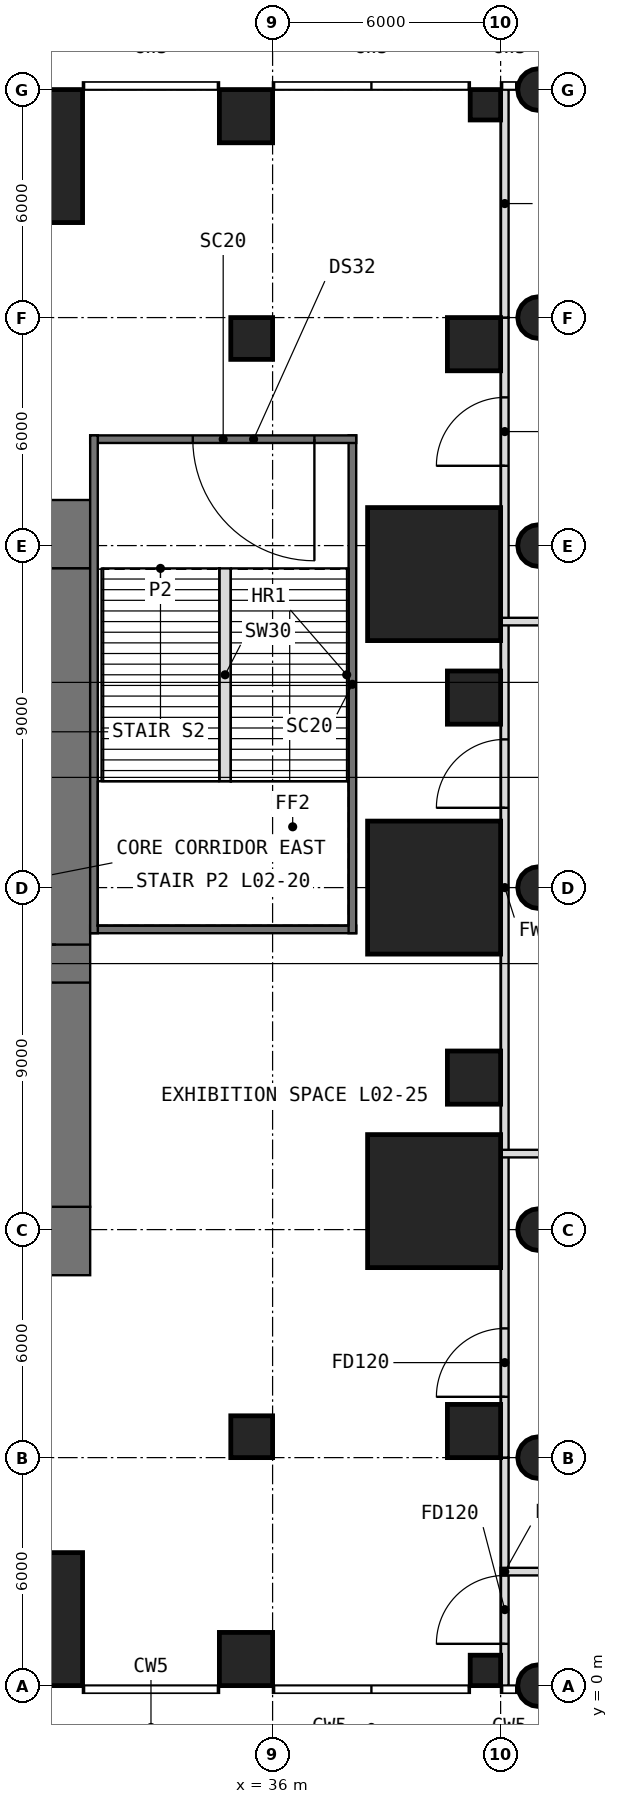
"""IFC4 building model, lengths in metres.
Left out: names, types, materials, properties, quantities, classifications, styles, units other than length and angle.
Written with IfcOpenShell. Run it as: python <this file> out.ifc"""

import sys

from ifc_helpers import new_model, si_unit, direction, frame, frame_2d, origin, origin_2d, place, context, subcontext, project, spatial, rectangle, circle, extrude, element, fill, save


model = new_model("IFC4")
c1 = context("Model", 3, precision=1e-05, world=origin(), true_north=direction((0.0, 1.0)))
c2 = subcontext(c1, "Body", "Model", "MODEL_VIEW")
j1 = project(units=[si_unit("LENGTHUNIT", "METRE"), si_unit("PLANEANGLEUNIT", "RADIAN")], contexts=[c1])
p1 = place(None, origin())
s1 = spatial("IfcSite", under=j1, at=p1, CompositionType="ELEMENT")
p2 = place(p1, origin())
s2 = spatial("IfcBuilding", under=s1, at=p2, CompositionType="ELEMENT")
p3 = place(p2, frame((0.0, 0.0, 11.0)))
s3 = spatial("IfcBuildingStorey", under=s2, at=p3, CompositionType="ELEMENT", Elevation=11.0)
p4 = place(p3, frame((29.25, 1.75, 0.0), z_axis=(0.0, 0.0, 1.0), x_axis=(1.0, 0.0, 0.0)))
e1 = element("IfcColumn", 1, at=p4, inside=s3, PredefinedType="COLUMN", context=c2, shape_type="SweptSolid", body=[
    extrude(rectangle(XDim=3.5, YDim=3.5, at=origin_2d()), origin(), (0.0, 0.0, 1.0), 7.0),
])
p5 = place(p3, frame((35.3, 0.7, 0.0), z_axis=(0.0, 0.0, 1.0), x_axis=(1.0, 0.0, 0.0)))
e2 = element("IfcColumn", 2, at=p5, inside=s3, PredefinedType="COLUMN", context=c2, shape_type="SweptSolid", body=[
    extrude(rectangle(XDim=1.4, YDim=1.4, at=origin_2d()), origin(), (0.0, 0.0, 1.0), 7.0),
])
p6 = place(p3, frame((41.6, 0.4, 0.0), z_axis=(0.0, 0.0, 1.0), x_axis=(1.0, 0.0, 0.0)))
e3 = element("IfcColumn", 3, at=p6, inside=s3, PredefinedType="COLUMN", context=c2, shape_type="SweptSolid", body=[
    extrude(rectangle(XDim=0.8, YDim=0.8, at=origin_2d()), origin(), (0.0, 0.0, 1.0), 7.0),
])
p7 = place(p3, frame((43.0, 0.0, 0.0), z_axis=(0.0, 0.0, 1.0), x_axis=(1.0, 0.0, 0.0)))
e4 = element("IfcColumn", 4, at=p7, inside=s3, PredefinedType="COLUMN", context=c2, shape_type="SweptSolid", body=[
    extrude(circle(Radius=0.55, at=origin_2d()), origin(), (0.0, 0.0, 1.0), 7.0),
])
p8 = place(p3, frame((35.45, 6.55, 0.0), z_axis=(0.0, 0.0, 1.0), x_axis=(1.0, 0.0, 0.0)))
e5 = element("IfcColumn", 5, at=p8, inside=s3, PredefinedType="COLUMN", context=c2, shape_type="SweptSolid", body=[
    extrude(rectangle(XDim=1.1, YDim=1.1, at=origin_2d()), origin(), (0.0, 0.0, 1.0), 7.0),
])
p9 = place(p3, frame((41.3, 6.7, 0.0), z_axis=(0.0, 0.0, 1.0), x_axis=(1.0, 0.0, 0.0)))
e6 = element("IfcColumn", 6, at=p9, inside=s3, PredefinedType="COLUMN", context=c2, shape_type="SweptSolid", body=[
    extrude(rectangle(XDim=1.4, YDim=1.4, at=origin_2d()), origin(), (0.0, 0.0, 1.0), 7.0),
])
p10 = place(p3, frame((43.0, 6.0, 0.0), z_axis=(0.0, 0.0, 1.0), x_axis=(1.0, 0.0, 0.0)))
e7 = element("IfcColumn", 7, at=p10, inside=s3, PredefinedType="COLUMN", context=c2, shape_type="SweptSolid", body=[
    extrude(circle(Radius=0.55, at=origin_2d()), origin(), (0.0, 0.0, 1.0), 7.0),
])
p11 = place(p3, frame((40.25, 12.75, 0.0), z_axis=(0.0, 0.0, 1.0), x_axis=(1.0, 0.0, 0.0)))
e8 = element("IfcColumn", 8, at=p11, inside=s3, PredefinedType="COLUMN", context=c2, shape_type="SweptSolid", body=[
    extrude(rectangle(XDim=3.5, YDim=3.5, at=origin_2d()), origin(), (0.0, 0.0, 1.0), 7.0),
])
p12 = place(p3, frame((43.0, 12.0, 0.0), z_axis=(0.0, 0.0, 1.0), x_axis=(1.0, 0.0, 0.0)))
e9 = element("IfcColumn", 9, at=p12, inside=s3, PredefinedType="COLUMN", context=c2, shape_type="SweptSolid", body=[
    extrude(circle(Radius=0.55, at=origin_2d()), origin(), (0.0, 0.0, 1.0), 7.0),
])
p13 = place(p3, frame((41.3, 16.0, 0.0), z_axis=(0.0, 0.0, 1.0), x_axis=(1.0, 0.0, 0.0)))
e10 = element("IfcColumn", 10, at=p13, inside=s3, PredefinedType="COLUMN", context=c2, shape_type="SweptSolid", body=[
    extrude(rectangle(XDim=1.4, YDim=1.4, at=origin_2d()), origin(), (0.0, 0.0, 1.0), 7.0),
])
p14 = place(p3, frame((40.25, 21.0, 0.0), z_axis=(0.0, 0.0, 1.0), x_axis=(1.0, 0.0, 0.0)))
e11 = element("IfcColumn", 11, at=p14, inside=s3, PredefinedType="COLUMN", context=c2, shape_type="SweptSolid", body=[
    extrude(rectangle(XDim=3.5, YDim=3.5, at=origin_2d()), origin(), (0.0, 0.0, 1.0), 7.0),
])
p15 = place(p3, frame((43.0, 21.0, 0.0), z_axis=(0.0, 0.0, 1.0), x_axis=(1.0, 0.0, 0.0)))
e12 = element("IfcColumn", 12, at=p15, inside=s3, PredefinedType="COLUMN", context=c2, shape_type="SweptSolid", body=[
    extrude(circle(Radius=0.55, at=origin_2d()), origin(), (0.0, 0.0, 1.0), 7.0),
])
p16 = place(p3, frame((41.3, 26.0, 0.0), z_axis=(0.0, 0.0, 1.0), x_axis=(1.0, 0.0, 0.0)))
e13 = element("IfcColumn", 13, at=p16, inside=s3, PredefinedType="COLUMN", context=c2, shape_type="SweptSolid", body=[
    extrude(rectangle(XDim=1.4, YDim=1.4, at=origin_2d()), origin(), (0.0, 0.0, 1.0), 7.0),
])
p17 = place(p3, frame((43.0, 30.0, 0.0), z_axis=(0.0, 0.0, 1.0), x_axis=(1.0, 0.0, 0.0)))
e14 = element("IfcColumn", 14, at=p17, inside=s3, PredefinedType="COLUMN", context=c2, shape_type="SweptSolid", body=[
    extrude(circle(Radius=0.55, at=origin_2d()), origin(), (0.0, 0.0, 1.0), 7.0),
])
p18 = place(p3, frame((40.25, 29.25, 0.0), z_axis=(0.0, 0.0, 1.0), x_axis=(1.0, 0.0, 0.0)))
e15 = element("IfcColumn", 15, at=p18, inside=s3, PredefinedType="COLUMN", context=c2, shape_type="SweptSolid", body=[
    extrude(rectangle(XDim=3.5, YDim=3.5, at=origin_2d()), origin(), (0.0, 0.0, 1.0), 7.0),
])
p19 = place(p3, frame((35.45, 35.45, 0.0), z_axis=(0.0, 0.0, 1.0), x_axis=(1.0, 0.0, 0.0)))
e16 = element("IfcColumn", 16, at=p19, inside=s3, PredefinedType="COLUMN", context=c2, shape_type="SweptSolid", body=[
    extrude(rectangle(XDim=1.1, YDim=1.1, at=origin_2d()), origin(), (0.0, 0.0, 1.0), 7.0),
])
p20 = place(p3, frame((41.3, 35.3, 0.0), z_axis=(0.0, 0.0, 1.0), x_axis=(1.0, 0.0, 0.0)))
e17 = element("IfcColumn", 17, at=p20, inside=s3, PredefinedType="COLUMN", context=c2, shape_type="SweptSolid", body=[
    extrude(rectangle(XDim=1.4, YDim=1.4, at=origin_2d()), origin(), (0.0, 0.0, 1.0), 7.0),
])
p21 = place(p3, frame((43.0, 36.0, 0.0), z_axis=(0.0, 0.0, 1.0), x_axis=(1.0, 0.0, 0.0)))
e18 = element("IfcColumn", 18, at=p21, inside=s3, PredefinedType="COLUMN", context=c2, shape_type="SweptSolid", body=[
    extrude(circle(Radius=0.55, at=origin_2d()), origin(), (0.0, 0.0, 1.0), 7.0),
])
p22 = place(p3, frame((29.25, 40.25, 0.0), z_axis=(0.0, 0.0, 1.0), x_axis=(1.0, 0.0, 0.0)))
e19 = element("IfcColumn", 19, at=p22, inside=s3, PredefinedType="COLUMN", context=c2, shape_type="SweptSolid", body=[
    extrude(rectangle(XDim=3.5, YDim=3.5, at=origin_2d()), origin(), (0.0, 0.0, 1.0), 7.0),
])
p23 = place(p3, frame((35.3, 41.3, 0.0), z_axis=(0.0, 0.0, 1.0), x_axis=(1.0, 0.0, 0.0)))
e20 = element("IfcColumn", 20, at=p23, inside=s3, PredefinedType="COLUMN", context=c2, shape_type="SweptSolid", body=[
    extrude(rectangle(XDim=1.4, YDim=1.4, at=origin_2d()), origin(), (0.0, 0.0, 1.0), 7.0),
])
p24 = place(p3, frame((41.6, 41.6, 0.0), z_axis=(0.0, 0.0, 1.0), x_axis=(1.0, 0.0, 0.0)))
e21 = element("IfcColumn", 21, at=p24, inside=s3, PredefinedType="COLUMN", context=c2, shape_type="SweptSolid", body=[
    extrude(rectangle(XDim=0.8, YDim=0.8, at=origin_2d()), origin(), (0.0, 0.0, 1.0), 7.0),
])
p25 = place(p3, frame((43.0, 42.0, 0.0), z_axis=(0.0, 0.0, 1.0), x_axis=(1.0, 0.0, 0.0)))
e22 = element("IfcColumn", 22, at=p25, inside=s3, PredefinedType="COLUMN", context=c2, shape_type="SweptSolid", body=[
    extrude(circle(Radius=0.55, at=origin_2d()), origin(), (0.0, 0.0, 1.0), 7.0),
])
p26 = place(p3, frame((10.8, 11.7, -0.3), z_axis=(0.0, 0.0, 1.0), x_axis=(1.0, 0.0, 0.0)))
e23 = element("IfcWall", 23, at=p26, inside=s3, PredefinedType="SHEAR", context=c2, shape_type="SweptSolid", body=[
    extrude(rectangle(XDim=20.4, YDim=1.8, at=frame_2d((10.2, 0.0))), origin(), (0.0, 0.0, 1.0), 7.1),
])
p27 = place(p26, frame((9.2, 0.0, 0.3)))
e24 = element("IfcOpeningElement", 24, at=p27, cuts=e23, PredefinedType="OPENING", context=c2, shape_type="SweptSolid", body=[
    extrude(rectangle(XDim=2.0, YDim=2.2, at=frame_2d((1.0, 1.1))), frame((0.0, 0.91, 0.0), z_axis=(0.0, -1.0, 0.0), x_axis=(1.0, 0.0, 0.0)), (0.0, 0.0, 1.0), 1.82),
])
p28 = place(p3, frame((10.8, 30.3, -0.3), z_axis=(0.0, 0.0, 1.0), x_axis=(1.0, 0.0, 0.0)))
e25 = element("IfcWall", 25, at=p28, inside=s3, PredefinedType="SHEAR", context=c2, shape_type="SweptSolid", body=[
    extrude(rectangle(XDim=20.4, YDim=1.8, at=frame_2d((10.2, 0.0))), origin(), (0.0, 0.0, 1.0), 7.1),
])
p29 = place(p28, frame((9.2, 0.0, 0.3)))
e26 = element("IfcOpeningElement", 26, at=p29, cuts=e25, PredefinedType="OPENING", context=c2, shape_type="SweptSolid", body=[
    extrude(rectangle(XDim=2.0, YDim=2.2, at=frame_2d((1.0, 1.1))), frame((0.0, 0.91, 0.0), z_axis=(0.0, -1.0, 0.0), x_axis=(1.0, 0.0, 0.0)), (0.0, 0.0, 1.0), 1.82),
])
p30 = place(p3, frame((30.3, 12.6, -0.3), z_axis=(0.0, 0.0, 1.0), x_axis=(0.0, 1.0, 0.0)))
e27 = element("IfcWall", 27, at=p30, inside=s3, PredefinedType="SHEAR", context=c2, shape_type="SweptSolid", body=[
    extrude(rectangle(XDim=16.8, YDim=1.8, at=frame_2d((8.4, 0.0))), origin(), (0.0, 0.0, 1.0), 7.1),
])
p31 = place(p30, frame((5.9, 0.0, 0.3)))
e28 = element("IfcOpeningElement", 28, at=p31, cuts=e27, PredefinedType="OPENING", context=c2, shape_type="SweptSolid", body=[
    extrude(rectangle(XDim=1.0, YDim=2.2, at=frame_2d((0.5, 1.1))), frame((0.0, 0.91, 0.0), z_axis=(0.0, -1.0, 0.0), x_axis=(1.0, 0.0, 0.0)), (0.0, 0.0, 1.0), 1.82),
])
p32 = place(p3, frame((31.2, 19.9, -0.3), z_axis=(0.0, 0.0, 1.0), x_axis=(1.0, 0.0, 0.0)))
e29 = element("IfcWall", 29, at=p32, inside=s3, PredefinedType="SOLIDWALL", context=c2, shape_type="SweptSolid", body=[
    extrude(rectangle(XDim=7.0, YDim=0.2, at=frame_2d((3.5, 0.0))), origin(), (0.0, 0.0, 1.0), 7.1),
])
p33 = place(p3, frame((38.1, 19.8, -0.3), z_axis=(0.0, 0.0, 1.0), x_axis=(0.0, 1.0, 0.0)))
e30 = element("IfcWall", 30, at=p33, inside=s3, PredefinedType="SOLIDWALL", context=c2, shape_type="SweptSolid", body=[
    extrude(rectangle(XDim=13.1, YDim=0.2, at=frame_2d((6.55, 0.0))), origin(), (0.0, 0.0, 1.0), 7.1),
])
p34 = place(p3, frame((38.2, 32.8, -0.3), z_axis=(0.0, 0.0, 1.0), x_axis=(-1.0, 0.0, 0.0)))
e31 = element("IfcWall", 31, at=p34, inside=s3, PredefinedType="SOLIDWALL", context=c2, shape_type="SweptSolid", body=[
    extrude(rectangle(XDim=7.0, YDim=0.2, at=frame_2d((3.5, 0.0))), origin(), (0.0, 0.0, 1.0), 7.1),
])
p35 = place(p34, frame((1.1, 0.0, 0.3)))
e32 = element("IfcOpeningElement", 32, at=p35, cuts=e31, PredefinedType="OPENING", context=c2, shape_type="SweptSolid", body=[
    extrude(rectangle(XDim=3.2, YDim=2.4, at=frame_2d((1.6, 1.2))), frame((0.0, 0.11, 0.0), z_axis=(0.0, -1.0, 0.0), x_axis=(1.0, 0.0, 0.0)), (0.0, 0.0, 1.0), 0.22),
])
p36 = place(p3, frame((31.3, 32.9, -0.3), z_axis=(0.0, 0.0, 1.0), x_axis=(0.0, -1.0, 0.0)))
e33 = element("IfcWall", 33, at=p36, inside=s3, PredefinedType="SOLIDWALL", context=c2, shape_type="SweptSolid", body=[
    extrude(rectangle(XDim=13.1, YDim=0.2, at=frame_2d((6.55, 0.0))), origin(), (0.0, 0.0, 1.0), 7.1),
])
p37 = place(p3, frame((42.11, 0.0, 0.0), z_axis=(0.0, 0.0, 1.0), x_axis=(0.0, 1.0, 0.0)))
e34 = element("IfcWall", 34, at=p37, inside=s3, PredefinedType="PARTITIONING", context=c2, shape_type="SweptSolid", body=[
    extrude(rectangle(XDim=6.0, YDim=0.2, at=frame_2d((3.0, 0.0))), origin(), (0.0, 0.0, 1.0), 5.98),
])
p38 = place(p37, frame((1.1, 0.0, 0.0)))
e35 = element("IfcOpeningElement", 35, at=p38, cuts=e34, PredefinedType="OPENING", context=c2, shape_type="SweptSolid", body=[
    extrude(rectangle(XDim=1.8, YDim=2.4, at=frame_2d((0.9, 1.2))), frame((0.0, 0.11, 0.0), z_axis=(0.0, -1.0, 0.0), x_axis=(1.0, 0.0, 0.0)), (0.0, 0.0, 1.0), 0.22),
])
p39 = place(p3, frame((42.11, 6.0, 0.0), z_axis=(0.0, 0.0, 1.0), x_axis=(0.0, 1.0, 0.0)))
e36 = element("IfcWall", 36, at=p39, inside=s3, PredefinedType="PARTITIONING", context=c2, shape_type="SweptSolid", body=[
    extrude(rectangle(XDim=30.0, YDim=0.2, at=frame_2d((15.0, 0.0))), origin(), (0.0, 0.0, 1.0), 6.6),
])
p40 = place(p39, frame((1.6, 0.0, 0.0)))
e37 = element("IfcOpeningElement", 37, at=p40, cuts=e36, PredefinedType="OPENING", context=c2, shape_type="SweptSolid", body=[
    extrude(rectangle(XDim=1.8, YDim=2.4, at=frame_2d((0.9, 1.2))), frame((0.0, 0.11, 0.0), z_axis=(0.0, -1.0, 0.0), x_axis=(1.0, 0.0, 0.0)), (0.0, 0.0, 1.0), 0.22),
])
p41 = place(p39, frame((17.1, 0.0, 0.0)))
e38 = element("IfcOpeningElement", 38, at=p41, cuts=e36, PredefinedType="OPENING", context=c2, shape_type="SweptSolid", body=[
    extrude(rectangle(XDim=1.8, YDim=2.4, at=frame_2d((0.9, 1.2))), frame((0.0, 0.11, 0.0), z_axis=(0.0, -1.0, 0.0), x_axis=(1.0, 0.0, 0.0)), (0.0, 0.0, 1.0), 0.22),
])
p42 = place(p39, frame((26.1, 0.0, 0.0)))
e39 = element("IfcOpeningElement", 39, at=p42, cuts=e36, PredefinedType="OPENING", context=c2, shape_type="SweptSolid", body=[
    extrude(rectangle(XDim=1.8, YDim=2.4, at=frame_2d((0.9, 1.2))), frame((0.0, 0.11, 0.0), z_axis=(0.0, -1.0, 0.0), x_axis=(1.0, 0.0, 0.0)), (0.0, 0.0, 1.0), 0.22),
])
p43 = place(p3, frame((42.11, 36.0, 0.0), z_axis=(0.0, 0.0, 1.0), x_axis=(0.0, 1.0, 0.0)))
e40 = element("IfcWall", 40, at=p43, inside=s3, PredefinedType="PARTITIONING", context=c2, shape_type="SweptSolid", body=[
    extrude(rectangle(XDim=6.0, YDim=0.2, at=frame_2d((3.0, 0.0))), origin(), (0.0, 0.0, 1.0), 5.98),
])
for number, where, z_axis, x_axis in (
    (41, (42.0, 3.0, 0.0), (0.0, 0.0, 1.0), (1.0, 0.0, 0.0)),
    (42, (42.0, 14.0, 0.0), (0.0, 0.0, 1.0), (1.0, 0.0, 0.0)),
):
    element("IfcWall", number, at=place(p3, frame(where, z_axis=z_axis, x_axis=x_axis)), inside=s3, PredefinedType="PARTITIONING", context=c2, shape_type="SweptSolid", body=[
        extrude(rectangle(XDim=13.7, YDim=0.2, at=frame_2d((6.85, 0.0))), origin(), (0.0, 0.0, 1.0), 6.6),
    ])
p44 = place(p3, frame((42.0, 28.0, 0.0), z_axis=(0.0, 0.0, 1.0), x_axis=(1.0, 0.0, 0.0)))
e43 = element("IfcWall", 43, at=p44, inside=s3, PredefinedType="PARTITIONING", context=c2, shape_type="SweptSolid", body=[
    extrude(rectangle(XDim=21.0, YDim=0.2, at=frame_2d((10.5, 0.0))), origin(), (0.0, 0.0, 1.0), 6.6),
])
p45 = place(p3, frame((34.75, 23.8, 0.0), z_axis=(0.0, 0.0, 1.0), x_axis=(0.0, 1.0, 0.0)))
e44 = element("IfcWall", 44, at=p45, inside=s3, PredefinedType="PARTITIONING", context=c2, shape_type="SweptSolid", body=[
    extrude(rectangle(XDim=5.6, YDim=0.3, at=frame_2d((2.8, 0.0))), origin(), (0.0, 0.0, 1.0), 7.0),
])
p46 = place(p31, origin())
e45 = element("IfcDoor", 45, at=p46, inside=s3, OperationType="SINGLE_SWING_RIGHT", PredefinedType="DOOR", context=c2, shape_type="SweptSolid", body=[
    extrude(rectangle(XDim=1.0, YDim=2.2, at=frame_2d((0.5, 1.1))), frame((0.0, 0.025, 0.0), z_axis=(0.0, -1.0, 0.0), x_axis=(1.0, 0.0, 0.0)), (0.0, 0.0, 1.0), 0.05),
])
fill(e28, e45)
p47 = place(p35, origin())
e46 = element("IfcDoor", 46, at=p47, inside=s3, OperationType="DOUBLE_DOOR_SINGLE_SWING", PredefinedType="DOOR", context=c2, shape_type="SweptSolid", body=[
    extrude(rectangle(XDim=3.2, YDim=2.4, at=frame_2d((1.6, 1.2))), frame((0.0, 0.025, 0.0), z_axis=(0.0, -1.0, 0.0), x_axis=(1.0, 0.0, 0.0)), (0.0, 0.0, 1.0), 0.05),
])
fill(e32, e46)
p48 = place(p38, origin())
e47 = element("IfcDoor", 47, at=p48, inside=s3, OperationType="DOUBLE_DOOR_SINGLE_SWING", PredefinedType="DOOR", context=c2, shape_type="SweptSolid", body=[
    extrude(rectangle(XDim=1.8, YDim=2.4, at=frame_2d((0.9, 1.2))), frame((0.0, 0.025, 0.0), z_axis=(0.0, -1.0, 0.0), x_axis=(1.0, 0.0, 0.0)), (0.0, 0.0, 1.0), 0.05),
])
fill(e35, e47)
p49 = place(p40, origin())
e48 = element("IfcDoor", 48, at=p49, inside=s3, OperationType="DOUBLE_DOOR_SINGLE_SWING", PredefinedType="DOOR", context=c2, shape_type="SweptSolid", body=[
    extrude(rectangle(XDim=1.8, YDim=2.4, at=frame_2d((0.9, 1.2))), frame((0.0, 0.025, 0.0), z_axis=(0.0, -1.0, 0.0), x_axis=(1.0, 0.0, 0.0)), (0.0, 0.0, 1.0), 0.05),
])
fill(e37, e48)
p50 = place(p41, origin())
e49 = element("IfcDoor", 49, at=p50, inside=s3, OperationType="DOUBLE_DOOR_SINGLE_SWING", PredefinedType="DOOR", context=c2, shape_type="SweptSolid", body=[
    extrude(rectangle(XDim=1.8, YDim=2.4, at=frame_2d((0.9, 1.2))), frame((0.0, 0.025, 0.0), z_axis=(0.0, -1.0, 0.0), x_axis=(1.0, 0.0, 0.0)), (0.0, 0.0, 1.0), 0.05),
])
fill(e38, e49)
p51 = place(p42, origin())
e50 = element("IfcDoor", 50, at=p51, inside=s3, OperationType="DOUBLE_DOOR_SINGLE_SWING", PredefinedType="DOOR", context=c2, shape_type="SweptSolid", body=[
    extrude(rectangle(XDim=1.8, YDim=2.4, at=frame_2d((0.9, 1.2))), frame((0.0, 0.025, 0.0), z_axis=(0.0, -1.0, 0.0), x_axis=(1.0, 0.0, 0.0)), (0.0, 0.0, 1.0), 0.05),
])
fill(e39, e50)
save(model, sys.argv[1])
